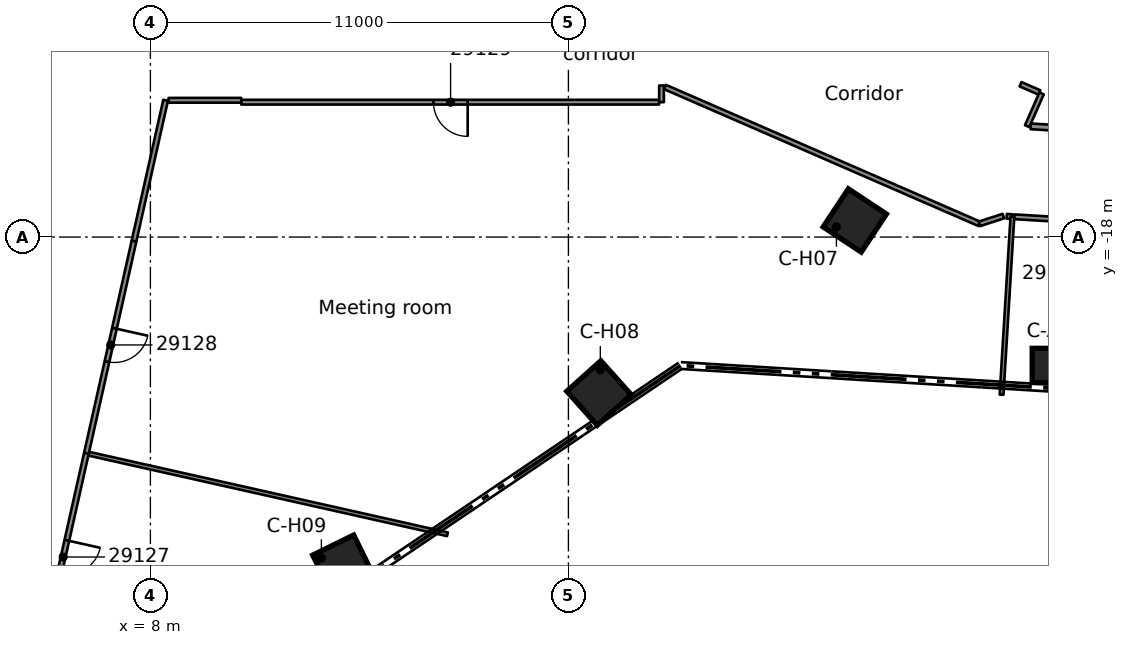
"""IFC4 building model, lengths in metres.
Left out: names, types, materials, properties, quantities, classifications, styles, units other than length and angle.
Written with IfcOpenShell. Run it as: python <this file> out.ifc"""

import sys

from ifc_helpers import new_model, si_unit, direction, frame, frame_2d, origin, origin_2d, place, context, subcontext, project, spatial, rectangle, extrude, element, fill, save


model = new_model("IFC4")
c1 = context("Model", 3, precision=1e-05, world=origin(), true_north=direction((0.0, 1.0)))
c2 = subcontext(c1, "Body", "Model", "MODEL_VIEW")
j1 = project(units=[si_unit("LENGTHUNIT", "METRE"), si_unit("PLANEANGLEUNIT", "RADIAN")], contexts=[c1])
p1 = place(None, origin())
s1 = spatial("IfcSite", under=j1, at=p1, CompositionType="ELEMENT")
p2 = place(p1, origin())
s2 = spatial("IfcBuilding", under=s1, at=p2, CompositionType="ELEMENT")
p3 = place(p2, frame((0.0, 0.0, 149.1)))
s3 = spatial("IfcBuildingStorey", under=s2, at=p3, CompositionType="ELEMENT", Elevation=149.1)
p4 = place(p3, frame((31.754, -21.378, 0.0), z_axis=(0.0, 0.0, 1.0), x_axis=(1.0, 0.0, 0.0)))
e1 = element("IfcColumn", 1, at=p4, inside=s3, PredefinedType="COLUMN", context=c2, shape_type="SweptSolid", body=[
    extrude(rectangle(XDim=1.1, YDim=0.9, at=origin_2d()), origin(), (0.0, 0.0, 1.0), 3.5),
])
for number, where, z_axis, x_axis in (
    (2, (26.536, -17.564, 0.0), (0.0, 0.0, 1.0), (0.834, -0.552, 0.0)),
    (3, (19.806, -22.104, 0.0), (0.0, 0.0, 1.0), (0.667, -0.745, 0.0)),
    (4, (13.075, -26.644, 0.0), (0.0, 0.0, 1.0), (0.441, -0.898, 0.0)),
):
    element("IfcColumn", number, at=place(p3, frame(where, z_axis=z_axis, x_axis=x_axis)), inside=s3, PredefinedType="COLUMN", context=c2, shape_type="SweptSolid", body=[
        extrude(rectangle(XDim=1.2, YDim=1.2, at=origin_2d()), origin(), (0.0, 0.0, 1.0), 3.5),
    ])
p5 = place(p3, frame((21.537, -14.05, 0.0), z_axis=(0.0, 0.0, 1.0), x_axis=(0.916891955624, -0.399135492924, 0.0)))
e5 = element("IfcWall", 5, at=p5, inside=s3, PredefinedType="PARTITIONING", context=c2, shape_type="SweptSolid", body=[
    extrude(rectangle(XDim=9.027, YDim=0.125, at=frame_2d((4.514, 0.0))), origin(), (0.0, 0.0, 1.0), 3.08),
])
p6 = place(p3, frame((30.897, -13.979, 0.0), z_axis=(0.0, 0.0, 1.0), x_axis=(0.917105858988, -0.398643755012, 0.0)))
e6 = element("IfcWall", 6, at=p6, inside=s3, PredefinedType="PARTITIONING", context=c2, shape_type="SweptSolid", body=[
    extrude(rectangle(XDim=0.542, YDim=0.125, at=frame_2d((0.271, 0.0))), origin(), (0.0, 0.0, 1.0), 3.08),
])
p7 = place(p3, frame((6.378, -23.701, 0.0), z_axis=(0.0, 0.0, 1.0), x_axis=(0.975712069102, -0.219056974802, 0.0)))
e7 = element("IfcWall", 7, at=p7, inside=s3, PredefinedType="PARTITIONING", context=c2, shape_type="SweptSolid", body=[
    extrude(rectangle(XDim=9.674, YDim=0.1, at=frame_2d((4.837, 0.0))), origin(), (0.0, 0.0, 1.0), 3.08),
])
p8 = place(p3, frame((30.533, -17.454, 0.0), z_axis=(0.0, 0.0, 1.0), x_axis=(0.998313083069, -0.058060211616, 0.0)))
e8 = element("IfcWall", 8, at=p8, inside=s3, PredefinedType="PARTITIONING", context=c2, shape_type="SweptSolid", body=[
    extrude(rectangle(XDim=0.151, YDim=0.125, at=frame_2d((0.076, 0.0))), origin(), (0.0, 0.0, 1.0), 3.08),
])
p9 = place(p3, frame((40.923, -18.089, 0.0), z_axis=(0.0, 0.0, 1.0), x_axis=(-0.998135704692, 0.06103372034, 0.0)))
e9 = element("IfcWall", 9, at=p9, inside=s3, PredefinedType="PARTITIONING", context=c2, shape_type="SweptSolid", body=[
    extrude(rectangle(XDim=10.208, YDim=0.125, at=frame_2d((5.104, 0.0))), origin(), (0.0, 0.0, 1.0), 3.08),
])
p10 = place(p9, frame((7.938, 0.0, 0.0)))
e10 = element("IfcOpeningElement", 10, at=p10, cuts=e9, PredefinedType="OPENING", context=c2, shape_type="SweptSolid", body=[
    extrude(rectangle(XDim=0.9, YDim=2.1, at=frame_2d((0.45, 1.05))), frame((0.0, 0.073, 0.0), z_axis=(0.0, -1.0, 0.0), x_axis=(1.0, 0.0, 0.0)), (0.0, 0.0, 1.0), 0.145),
])
p11 = place(p3, frame((31.165, -15.087, 0.0), z_axis=(0.0, 0.0, 1.0), x_axis=(0.998142132741, -0.060928506027, 0.0)))
e11 = element("IfcWall", 11, at=p11, inside=s3, PredefinedType="PARTITIONING", context=c2, shape_type="SweptSolid", body=[
    extrude(rectangle(XDim=9.897, YDim=0.15, at=frame_2d((4.949, 0.0))), origin(), (0.0, 0.0, 1.0), 3.08),
])
p12 = place(p11, frame((2.006, 0.0, 0.0)))
e12 = element("IfcOpeningElement", 12, at=p12, cuts=e11, PredefinedType="OPENING", context=c2, shape_type="SweptSolid", body=[
    extrude(rectangle(XDim=0.9, YDim=2.1, at=frame_2d((0.45, 1.05))), frame((0.0, 0.085, 0.0), z_axis=(0.0, -1.0, 0.0), x_axis=(1.0, 0.0, 0.0)), (0.0, 0.0, 1.0), 0.17),
])
p13 = place(p3, frame((21.387, -14.451, 0.0), z_axis=(0.0, 0.0, 1.0), x_axis=(-1.0, 0.0, 0.0)))
e13 = element("IfcWall", 13, at=p13, inside=s3, PredefinedType="PARTITIONING", context=c2, shape_type="SweptSolid", body=[
    extrude(rectangle(XDim=10.996, YDim=0.125, at=frame_2d((5.498, 0.0))), origin(), (0.0, 0.0, 1.0), 3.08),
])
p14 = place(p13, frame((5.038, 0.0, 0.0)))
e14 = element("IfcOpeningElement", 14, at=p14, cuts=e13, PredefinedType="OPENING", context=c2, shape_type="SweptSolid", body=[
    extrude(rectangle(XDim=0.9, YDim=2.1, at=frame_2d((0.45, 1.05))), frame((0.0, 0.073, 0.0), z_axis=(0.0, -1.0, 0.0), x_axis=(1.0, 0.0, 0.0)), (0.0, 0.0, 1.0), 0.145),
])
p15 = place(p3, frame((8.479, -14.401, 0.0), z_axis=(0.0, 0.0, 1.0), x_axis=(1.0, 0.0, 0.0)))
e15 = element("IfcWall", 15, at=p15, inside=s3, PredefinedType="PARTITIONING", context=c2, shape_type="SweptSolid", body=[
    extrude(rectangle(XDim=1.912, YDim=0.125, at=frame_2d((0.956, 0.0))), origin(), (0.0, 0.0, 1.0), 3.08),
])
p16 = place(p3, frame((31.071, -15.081, 0.0), z_axis=(0.0, 0.0, 1.0), x_axis=(0.404017334041, 0.914751328938, 0.0)))
e16 = element("IfcWall", 16, at=p16, inside=s3, PredefinedType="PARTITIONING", context=c2, shape_type="SweptSolid", body=[
    extrude(rectangle(XDim=0.94, YDim=0.125, at=frame_2d((0.47, 0.0))), origin(), (0.0, 0.0, 1.0), 3.08),
])
p17 = place(p3, frame((29.814, -17.653, 0.0), z_axis=(0.0, 0.0, 1.0), x_axis=(0.951047586281, 0.30904447678, 0.0)))
e17 = element("IfcWall", 17, at=p17, inside=s3, PredefinedType="PARTITIONING", context=c2, shape_type="SweptSolid", body=[
    extrude(rectangle(XDim=0.664, YDim=0.125, at=frame_2d((0.332, 0.0))), origin(), (0.0, 0.0, 1.0), 3.08),
])
p18 = place(p3, frame((6.317, -23.687, 0.0), z_axis=(0.0, 0.0, 1.0), x_axis=(-0.21900849334, -0.975722952402, 0.0)))
e18 = element("IfcWall", 18, at=p18, inside=s3, PredefinedType="PARTITIONING", context=c2, shape_type="SweptSolid", body=[
    extrude(rectangle(XDim=5.721, YDim=0.125, at=frame_2d((2.86, 0.0))), origin(), (0.0, 0.0, 1.0), 3.08),
])
p19 = place(p18, frame((2.35, 0.0, 0.0)))
e19 = element("IfcOpeningElement", 19, at=p19, cuts=e18, PredefinedType="OPENING", context=c2, shape_type="SweptSolid", body=[
    extrude(rectangle(XDim=0.9, YDim=2.1, at=frame_2d((0.45, 1.05))), frame((0.0, 0.073, 0.0), z_axis=(0.0, -1.0, 0.0), x_axis=(1.0, 0.0, 0.0)), (0.0, 0.0, 1.0), 0.145),
])
p20 = place(p3, frame((7.569, -18.107, 0.0), z_axis=(0.0, 0.0, 1.0), x_axis=(0.218992134919, 0.975726624031, 0.0)))
e20 = element("IfcWall", 20, at=p20, inside=s3, PredefinedType="PARTITIONING", context=c2, shape_type="SweptSolid", body=[
    extrude(rectangle(XDim=3.798, YDim=0.125, at=frame_2d((1.899, 0.0))), origin(), (0.0, 0.0, 1.0), 3.08),
])
p21 = place(p3, frame((7.569, -18.107, 0.0), z_axis=(0.0, 0.0, 1.0), x_axis=(-0.218959545299, -0.975733937876, 0.0)))
e21 = element("IfcWall", 21, at=p21, inside=s3, PredefinedType="PARTITIONING", context=c2, shape_type="SweptSolid", body=[
    extrude(rectangle(XDim=5.719, YDim=0.125, at=frame_2d((2.859, 0.0))), origin(), (0.0, 0.0, 1.0), 3.08),
])
p22 = place(p21, frame((2.35, 0.0, 0.0)))
e22 = element("IfcOpeningElement", 22, at=p22, cuts=e21, PredefinedType="OPENING", context=c2, shape_type="SweptSolid", body=[
    extrude(rectangle(XDim=0.9, YDim=2.1, at=frame_2d((0.45, 1.05))), frame((0.0, 0.073, 0.0), z_axis=(0.0, -1.0, 0.0), x_axis=(1.0, 0.0, 0.0)), (0.0, 0.0, 1.0), 0.145),
])
p23 = place(p3, frame((30.398, -22.147, 0.0), z_axis=(0.0, 0.0, 1.0), x_axis=(0.060972554319, 0.998139442974, 0.0)))
e23 = element("IfcWall", 23, at=p23, inside=s3, PredefinedType="PARTITIONING", context=c2, shape_type="SweptSolid", body=[
    extrude(rectangle(XDim=4.693, YDim=0.1, at=frame_2d((2.346, 0.0))), origin(), (0.0, 0.0, 1.0), 3.08),
])
p24 = place(p3, frame((21.45, -14.451, 0.0), z_axis=(0.0, 0.0, 1.0), x_axis=(0.0, 1.0, 0.0)))
e24 = element("IfcWall", 24, at=p24, inside=s3, PredefinedType="PARTITIONING", context=c2, shape_type="SweptSolid", body=[
    extrude(rectangle(XDim=0.439, YDim=0.125, at=frame_2d((0.219, 0.0))), origin(), (0.0, 0.0, 1.0), 3.08),
])
p25 = place(p19, origin())
e25 = element("IfcDoor", 25, at=p25, inside=s3, OperationType="SINGLE_SWING_LEFT", PredefinedType="DOOR", context=c2, shape_type="SweptSolid", body=[
    extrude(rectangle(XDim=0.9, YDim=2.1, at=frame_2d((0.45, 1.05))), frame((0.0, 0.025, 0.0), z_axis=(0.0, -1.0, 0.0), x_axis=(1.0, 0.0, 0.0)), (0.0, 0.0, 1.0), 0.05),
])
fill(e19, e25)
p26 = place(p22, origin())
e26 = element("IfcDoor", 26, at=p26, inside=s3, OperationType="SINGLE_SWING_LEFT", PredefinedType="DOOR", context=c2, shape_type="SweptSolid", body=[
    extrude(rectangle(XDim=0.9, YDim=2.1, at=frame_2d((0.45, 1.05))), frame((0.0, 0.025, 0.0), z_axis=(0.0, -1.0, 0.0), x_axis=(1.0, 0.0, 0.0)), (0.0, 0.0, 1.0), 0.05),
])
fill(e22, e26)
p27 = place(p14, origin())
e27 = element("IfcDoor", 27, at=p27, inside=s3, OperationType="SINGLE_SWING_LEFT", PredefinedType="DOOR", context=c2, shape_type="SweptSolid", body=[
    extrude(rectangle(XDim=0.9, YDim=2.1, at=frame_2d((0.45, 1.05))), frame((0.0, 0.025, 0.0), z_axis=(0.0, -1.0, 0.0), x_axis=(1.0, 0.0, 0.0)), (0.0, 0.0, 1.0), 0.05),
])
fill(e14, e27)
save(model, sys.argv[1])
